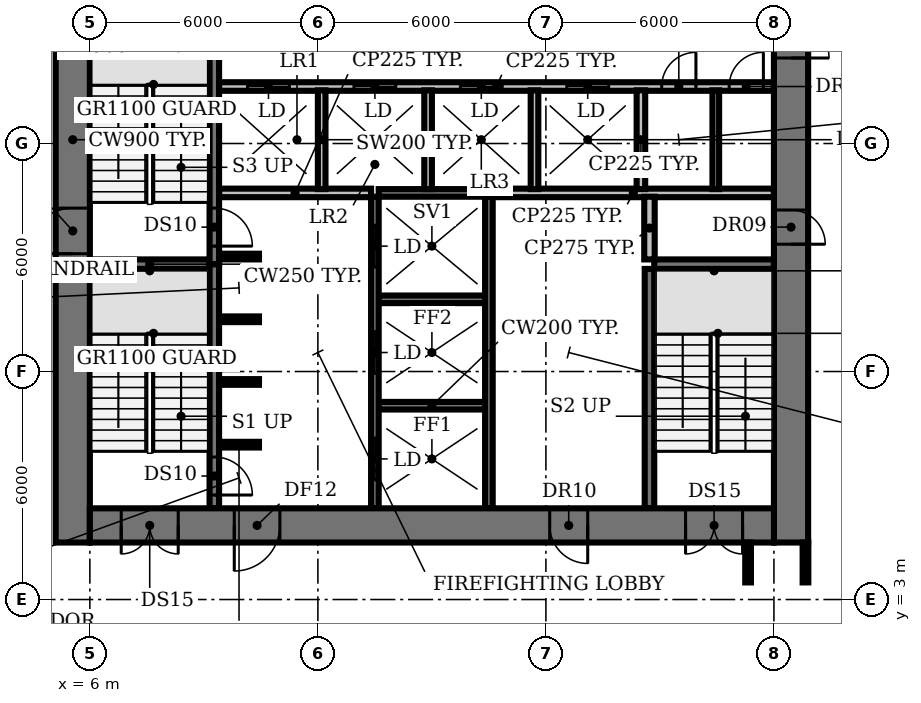
"""IFC4 building model, lengths in metres.
Left out: names, types, materials, properties, quantities, classifications, styles, units other than length and angle.
Written with IfcOpenShell. Run it as: python <this file> out.ifc"""

import sys

from ifc_helpers import new_model, si_unit, direction, frame, frame_2d, origin, place, context, subcontext, project, spatial, rectangle, extrude, element, fill, save


model = new_model("IFC4")
c1 = context("Model", 3, precision=1e-05, world=origin(), true_north=direction((0.0, 1.0)))
c2 = subcontext(c1, "Body", "Model", "MODEL_VIEW")
j1 = project(units=[si_unit("LENGTHUNIT", "METRE"), si_unit("PLANEANGLEUNIT", "RADIAN")], contexts=[c1])
p1 = place(None, origin())
s1 = spatial("IfcSite", under=j1, at=p1, CompositionType="ELEMENT")
p2 = place(p1, origin())
s2 = spatial("IfcBuilding", under=s1, at=p2, CompositionType="ELEMENT")
p3 = place(p2, frame((0.0, 0.0, 24.5)))
s3 = spatial("IfcBuildingStorey", under=s2, at=p3, CompositionType="ELEMENT", Elevation=24.5)
p4 = place(p3, frame((9.4, 7.075, 0.0), z_axis=(0.0, 0.0, 1.0), x_axis=(1.0, 0.0, 0.0)))
e1 = element("IfcWall", 1, at=p4, inside=s3, PredefinedType="SHEAR", context=c2, shape_type="SweptSolid", body=[
    extrude(rectangle(XDim=1.05, YDim=0.15, at=frame_2d((0.525, 0.0))), origin(), (0.0, 0.0, 1.0), 4.15),
])
p5 = place(p3, frame((13.6, 8.1, 0.0), z_axis=(0.0, 0.0, 1.0), x_axis=(1.0, 0.0, 0.0)))
e2 = element("IfcWall", 2, at=p5, inside=s3, PredefinedType="SHEAR", context=c2, shape_type="SweptSolid", body=[
    extrude(rectangle(XDim=2.8, YDim=0.2, at=frame_2d((1.4, 0.0))), origin(), (0.0, 0.0, 1.0), 4.15),
])
for number, where, z_axis, x_axis in (
    (3, (9.4, 8.725, 0.0), (0.0, 0.0, 1.0), (1.0, 0.0, 0.0)),
    (4, (9.4, 10.375, 0.0), (0.0, 0.0, 1.0), (1.0, 0.0, 0.0)),
):
    element("IfcWall", number, at=place(p3, frame(where, z_axis=z_axis, x_axis=x_axis)), inside=s3, PredefinedType="SHEAR", context=c2, shape_type="SweptSolid", body=[
        extrude(rectangle(XDim=1.05, YDim=0.15, at=frame_2d((0.525, 0.0))), origin(), (0.0, 0.0, 1.0), 4.15),
    ])
p6 = place(p3, frame((13.6, 10.9, 0.0), z_axis=(0.0, 0.0, 1.0), x_axis=(1.0, 0.0, 0.0)))
e5 = element("IfcWall", 5, at=p6, inside=s3, PredefinedType="SHEAR", context=c2, shape_type="SweptSolid", body=[
    extrude(rectangle(XDim=2.8, YDim=0.2, at=frame_2d((1.4, 0.0))), origin(), (0.0, 0.0, 1.0), 4.15),
])
for number, where, z_axis, x_axis in (
    (6, (6.0, 11.825, 0.0), (0.0, 0.0, 1.0), (1.0, 0.0, 0.0)),
    (7, (20.85, 11.825, 0.0), (0.0, 0.0, 1.0), (1.0, 0.0, 0.0)),
):
    element("IfcWall", number, at=place(p3, frame(where, z_axis=z_axis, x_axis=x_axis)), inside=s3, PredefinedType="SHEAR", context=c2, shape_type="SweptSolid", body=[
        extrude(rectangle(XDim=3.15, YDim=0.25, at=frame_2d((1.575, 0.0))), origin(), (0.0, 0.0, 1.0), 4.15),
    ])
p7 = place(p3, frame((9.4, 12.025, 0.0), z_axis=(0.0, 0.0, 1.0), x_axis=(1.0, 0.0, 0.0)))
e8 = element("IfcWall", 8, at=p7, inside=s3, PredefinedType="SHEAR", context=c2, shape_type="SweptSolid", body=[
    extrude(rectangle(XDim=1.05, YDim=0.15, at=frame_2d((0.525, 0.0))), origin(), (0.0, 0.0, 1.0), 4.15),
])
p8 = place(p3, frame((9.4, 13.7, 0.0), z_axis=(0.0, 0.0, 1.0), x_axis=(1.0, 0.0, 0.0)))
e9 = element("IfcWall", 9, at=p8, inside=s3, PredefinedType="PARTITIONING", context=c2, shape_type="SweptSolid", body=[
    extrude(rectangle(XDim=4.0, YDim=0.225, at=frame_2d((2.0, 0.0))), origin(), (0.0, 0.0, 1.0), 4.15),
])
p9 = place(p3, frame((13.6, 13.7, 0.0), z_axis=(0.0, 0.0, 1.0), x_axis=(1.0, 0.0, 0.0)))
e10 = element("IfcWall", 10, at=p9, inside=s3, PredefinedType="SHEAR", context=c2, shape_type="SweptSolid", body=[
    extrude(rectangle(XDim=2.8, YDim=0.2, at=frame_2d((1.4, 0.0))), origin(), (0.0, 0.0, 1.0), 4.15),
])
p10 = place(p3, frame((16.6, 13.7, 0.0), z_axis=(0.0, 0.0, 1.0), x_axis=(1.0, 0.0, 0.0)))
e11 = element("IfcWall", 11, at=p10, inside=s3, PredefinedType="PARTITIONING", context=c2, shape_type="SweptSolid", body=[
    extrude(rectangle(XDim=7.4, YDim=0.225, at=frame_2d((3.7, 0.0))), origin(), (0.0, 0.0, 1.0), 4.15),
])
p11 = place(p3, frame((9.4, 16.5, 0.0), z_axis=(0.0, 0.0, 1.0), x_axis=(1.0, 0.0, 0.0)))
e12 = element("IfcWall", 12, at=p11, inside=s3, PredefinedType="PARTITIONING", context=c2, shape_type="SweptSolid", body=[
    extrude(rectangle(XDim=14.6, YDim=0.225, at=frame_2d((7.3, 0.0))), origin(), (0.0, 0.0, 1.0), 4.15),
])
p12 = place(p11, frame((0.75, 0.0, 0.0)))
e13 = element("IfcOpeningElement", 13, at=p12, cuts=e12, PredefinedType="OPENING", context=c2, shape_type="SweptSolid", body=[
    extrude(rectangle(XDim=1.1, YDim=2.1, at=frame_2d((0.55, 1.05))), frame((0.0, 0.123, 0.0), z_axis=(0.0, -1.0, 0.0), x_axis=(1.0, 0.0, 0.0)), (0.0, 0.0, 1.0), 0.245),
])
p13 = place(p11, frame((3.55, 0.0, 0.0)))
e14 = element("IfcOpeningElement", 14, at=p13, cuts=e12, PredefinedType="OPENING", context=c2, shape_type="SweptSolid", body=[
    extrude(rectangle(XDim=1.1, YDim=2.1, at=frame_2d((0.55, 1.05))), frame((0.0, 0.123, 0.0), z_axis=(0.0, -1.0, 0.0), x_axis=(1.0, 0.0, 0.0)), (0.0, 0.0, 1.0), 0.245),
])
p14 = place(p11, frame((6.35, 0.0, 0.0)))
e15 = element("IfcOpeningElement", 15, at=p14, cuts=e12, PredefinedType="OPENING", context=c2, shape_type="SweptSolid", body=[
    extrude(rectangle(XDim=1.1, YDim=2.1, at=frame_2d((0.55, 1.05))), frame((0.0, 0.123, 0.0), z_axis=(0.0, -1.0, 0.0), x_axis=(1.0, 0.0, 0.0)), (0.0, 0.0, 1.0), 0.245),
])
p15 = place(p11, frame((9.15, 0.0, 0.0)))
e16 = element("IfcOpeningElement", 16, at=p15, cuts=e12, PredefinedType="OPENING", context=c2, shape_type="SweptSolid", body=[
    extrude(rectangle(XDim=1.1, YDim=2.1, at=frame_2d((0.55, 1.05))), frame((0.0, 0.123, 0.0), z_axis=(0.0, -1.0, 0.0), x_axis=(1.0, 0.0, 0.0)), (0.0, 0.0, 1.0), 0.245),
])
p16 = place(p11, frame((11.647, 0.0, 0.0)))
e17 = element("IfcOpeningElement", 17, at=p16, cuts=e12, PredefinedType="OPENING", context=c2, shape_type="SweptSolid", body=[
    extrude(rectangle(XDim=0.9, YDim=2.1, at=frame_2d((0.45, 1.05))), frame((0.0, 0.123, 0.0), z_axis=(0.0, -1.0, 0.0), x_axis=(1.0, 0.0, 0.0)), (0.0, 0.0, 1.0), 0.245),
])
p17 = place(p11, frame((13.423, 0.0, 0.0)))
e18 = element("IfcOpeningElement", 18, at=p17, cuts=e12, PredefinedType="OPENING", context=c2, shape_type="SweptSolid", body=[
    extrude(rectangle(XDim=0.9, YDim=2.1, at=frame_2d((0.45, 1.05))), frame((0.0, 0.123, 0.0), z_axis=(0.0, -1.0, 0.0), x_axis=(1.0, 0.0, 0.0)), (0.0, 0.0, 1.0), 0.245),
])
p18 = place(p3, frame((9.275, 11.825, 0.0), z_axis=(0.0, 0.0, 1.0), x_axis=(0.0, -1.0, 0.0)))
e19 = element("IfcWall", 19, at=p18, inside=s3, PredefinedType="SHEAR", context=c2, shape_type="SweptSolid", body=[
    extrude(rectangle(XDim=6.425, YDim=0.25, at=frame_2d((3.212, 0.0))), origin(), (0.0, 0.0, 1.0), 4.15),
])
p19 = place(p18, frame((5.075, 0.0, 0.0)))
e20 = element("IfcOpeningElement", 20, at=p19, cuts=e19, PredefinedType="OPENING", context=c2, shape_type="SweptSolid", body=[
    extrude(rectangle(XDim=1.0, YDim=2.1, at=frame_2d((0.5, 1.05))), frame((0.0, 0.135, 0.0), z_axis=(0.0, -1.0, 0.0), x_axis=(1.0, 0.0, 0.0)), (0.0, 0.0, 1.0), 0.27),
])
p20 = place(p3, frame((9.275, 18.375, 0.0), z_axis=(0.0, 0.0, 1.0), x_axis=(0.0, -1.0, 0.0)))
e21 = element("IfcWall", 21, at=p20, inside=s3, PredefinedType="SHEAR", context=c2, shape_type="SweptSolid", body=[
    extrude(rectangle(XDim=6.55, YDim=0.25, at=frame_2d((3.275, 0.0))), origin(), (0.0, 0.0, 1.0), 4.15),
])
p21 = place(p20, frame((5.075, 0.0, 0.0)))
e22 = element("IfcOpeningElement", 22, at=p21, cuts=e21, PredefinedType="OPENING", context=c2, shape_type="SweptSolid", body=[
    extrude(rectangle(XDim=1.0, YDim=2.1, at=frame_2d((0.5, 1.05))), frame((0.0, 0.135, 0.0), z_axis=(0.0, -1.0, 0.0), x_axis=(1.0, 0.0, 0.0)), (0.0, 0.0, 1.0), 0.27),
])
p22 = place(p3, frame((12.1, 13.8, 0.0), z_axis=(0.0, 0.0, 1.0), x_axis=(0.0, 1.0, 0.0)))
e23 = element("IfcWall", 23, at=p22, inside=s3, PredefinedType="SOLIDWALL", context=c2, shape_type="SweptSolid", body=[
    extrude(rectangle(XDim=2.6, YDim=0.2, at=frame_2d((1.3, 0.0))), origin(), (0.0, 0.0, 1.0), 4.15),
])
p23 = place(p3, frame((13.5, 5.4, 0.0), z_axis=(0.0, 0.0, 1.0), x_axis=(0.0, 1.0, 0.0)))
e24 = element("IfcWall", 24, at=p23, inside=s3, PredefinedType="SHEAR", context=c2, shape_type="SweptSolid", body=[
    extrude(rectangle(XDim=8.2, YDim=0.2, at=frame_2d((4.1, 0.0))), origin(), (0.0, 0.0, 1.0), 4.15),
])
p24 = place(p23, frame((0.75, 0.0, 0.0)))
e25 = element("IfcOpeningElement", 25, at=p24, cuts=e24, PredefinedType="OPENING", context=c2, shape_type="SweptSolid", body=[
    extrude(rectangle(XDim=1.1, YDim=2.1, at=frame_2d((0.55, 1.05))), frame((0.0, 0.11, 0.0), z_axis=(0.0, -1.0, 0.0), x_axis=(1.0, 0.0, 0.0)), (0.0, 0.0, 1.0), 0.22),
])
p25 = place(p23, frame((3.55, 0.0, 0.0)))
e26 = element("IfcOpeningElement", 26, at=p25, cuts=e24, PredefinedType="OPENING", context=c2, shape_type="SweptSolid", body=[
    extrude(rectangle(XDim=1.1, YDim=2.1, at=frame_2d((0.55, 1.05))), frame((0.0, 0.11, 0.0), z_axis=(0.0, -1.0, 0.0), x_axis=(1.0, 0.0, 0.0)), (0.0, 0.0, 1.0), 0.22),
])
p26 = place(p23, frame((6.35, 0.0, 0.0)))
e27 = element("IfcOpeningElement", 27, at=p26, cuts=e24, PredefinedType="OPENING", context=c2, shape_type="SweptSolid", body=[
    extrude(rectangle(XDim=1.1, YDim=2.1, at=frame_2d((0.55, 1.05))), frame((0.0, 0.11, 0.0), z_axis=(0.0, -1.0, 0.0), x_axis=(1.0, 0.0, 0.0)), (0.0, 0.0, 1.0), 0.22),
])
p27 = place(p3, frame((14.9, 13.8, 0.0), z_axis=(0.0, 0.0, 1.0), x_axis=(0.0, 1.0, 0.0)))
e28 = element("IfcWall", 28, at=p27, inside=s3, PredefinedType="SOLIDWALL", context=c2, shape_type="SweptSolid", body=[
    extrude(rectangle(XDim=2.6, YDim=0.2, at=frame_2d((1.3, 0.0))), origin(), (0.0, 0.0, 1.0), 4.15),
])
p28 = place(p3, frame((16.5, 5.4, 0.0), z_axis=(0.0, 0.0, 1.0), x_axis=(0.0, 1.0, 0.0)))
e29 = element("IfcWall", 29, at=p28, inside=s3, PredefinedType="SHEAR", context=c2, shape_type="SweptSolid", body=[
    extrude(rectangle(XDim=8.2, YDim=0.2, at=frame_2d((4.1, 0.0))), origin(), (0.0, 0.0, 1.0), 4.15),
])
p29 = place(p3, frame((17.7, 13.8, 0.0), z_axis=(0.0, 0.0, 1.0), x_axis=(0.0, 1.0, 0.0)))
e30 = element("IfcWall", 30, at=p29, inside=s3, PredefinedType="SOLIDWALL", context=c2, shape_type="SweptSolid", body=[
    extrude(rectangle(XDim=2.6, YDim=0.2, at=frame_2d((1.3, 0.0))), origin(), (0.0, 0.0, 1.0), 4.15),
])
p30 = place(p3, frame((20.5, 13.8, 0.0), z_axis=(0.0, 0.0, 1.0), x_axis=(0.0, 1.0, 0.0)))
e31 = element("IfcWall", 31, at=p30, inside=s3, PredefinedType="PARTITIONING", context=c2, shape_type="SweptSolid", body=[
    extrude(rectangle(XDim=2.6, YDim=0.225, at=frame_2d((1.3, 0.0))), origin(), (0.0, 0.0, 1.0), 4.15),
])
p31 = place(p3, frame((20.725, 5.4, 0.0), z_axis=(0.0, 0.0, 1.0), x_axis=(0.0, 1.0, 0.0)))
e32 = element("IfcWall", 32, at=p31, inside=s3, PredefinedType="SHEAR", context=c2, shape_type="SweptSolid", body=[
    extrude(rectangle(XDim=6.3, YDim=0.25, at=frame_2d((3.15, 0.0))), origin(), (0.0, 0.0, 1.0), 4.15),
])
p32 = place(p3, frame((20.725, 11.95, 0.0), z_axis=(0.0, 0.0, 1.0), x_axis=(0.0, 1.0, 0.0)))
e33 = element("IfcWall", 33, at=p32, inside=s3, PredefinedType="PARTITIONING", context=c2, shape_type="SweptSolid", body=[
    extrude(rectangle(XDim=1.65, YDim=0.275, at=frame_2d((0.825, 0.0))), origin(), (0.0, 0.0, 1.0), 4.15),
])
p33 = place(p3, frame((22.47, 13.8, 0.0), z_axis=(0.0, 0.0, 1.0), x_axis=(0.0, 1.0, 0.0)))
e34 = element("IfcWall", 34, at=p33, inside=s3, PredefinedType="PARTITIONING", context=c2, shape_type="SweptSolid", body=[
    extrude(rectangle(XDim=2.6, YDim=0.175, at=frame_2d((1.3, 0.0))), origin(), (0.0, 0.0, 1.0), 4.15),
])
p34 = place(p3, frame((5.55, 4.5, 0.0), z_axis=(0.0, 0.0, 1.0), x_axis=(0.0, 1.0, 0.0)))
e35 = element("IfcWall", 35, at=p34, inside=s3, PredefinedType="SHEAR", context=c2, shape_type="SweptSolid", body=[
    extrude(rectangle(XDim=21.2, YDim=0.9, at=frame_2d((10.6, 0.0))), origin(), (0.0, 0.0, 1.0), 4.15),
])
p35 = place(p34, frame((7.6, 0.0, 0.0)))
e36 = element("IfcOpeningElement", 36, at=p35, cuts=e35, PredefinedType="OPENING", context=c2, shape_type="SweptSolid", body=[
    extrude(rectangle(XDim=1.2, YDim=2.1, at=frame_2d((0.6, 1.05))), frame((0.0, 0.46, 0.0), z_axis=(0.0, -1.0, 0.0), x_axis=(1.0, 0.0, 0.0)), (0.0, 0.0, 1.0), 0.92),
])
p36 = place(p34, frame((14.15, 0.0, 0.0)))
e37 = element("IfcOpeningElement", 37, at=p36, cuts=e35, PredefinedType="OPENING", context=c2, shape_type="SweptSolid", body=[
    extrude(rectangle(XDim=1.2, YDim=2.1, at=frame_2d((0.6, 1.05))), frame((0.0, 0.46, 0.0), z_axis=(0.0, -1.0, 0.0), x_axis=(1.0, 0.0, 0.0)), (0.0, 0.0, 1.0), 0.92),
])
p37 = place(p3, frame((24.45, 25.7, 0.0), z_axis=(0.0, 0.0, 1.0), x_axis=(0.0, -1.0, 0.0)))
e38 = element("IfcWall", 38, at=p37, inside=s3, PredefinedType="SHEAR", context=c2, shape_type="SweptSolid", body=[
    extrude(rectangle(XDim=21.2, YDim=0.9, at=frame_2d((10.6, 0.0))), origin(), (0.0, 0.0, 1.0), 4.15),
])
p38 = place(p37, frame((12.45, 0.0, 0.0)))
e39 = element("IfcOpeningElement", 39, at=p38, cuts=e38, PredefinedType="OPENING", context=c2, shape_type="SweptSolid", body=[
    extrude(rectangle(XDim=0.9, YDim=2.1, at=frame_2d((0.45, 1.05))), frame((0.0, 0.46, 0.0), z_axis=(0.0, -1.0, 0.0), x_axis=(1.0, 0.0, 0.0)), (0.0, 0.0, 1.0), 0.92),
])
p39 = place(p37, frame((6.45, 0.0, 0.0)))
e40 = element("IfcOpeningElement", 40, at=p39, cuts=e38, PredefinedType="OPENING", context=c2, shape_type="SweptSolid", body=[
    extrude(rectangle(XDim=2.0, YDim=2.1, at=frame_2d((1.0, 1.05))), frame((0.0, 0.46, 0.0), z_axis=(0.0, -1.0, 0.0), x_axis=(1.0, 0.0, 0.0)), (0.0, 0.0, 1.0), 0.92),
])
p40 = place(p3, frame((24.0, 4.95, 0.0), z_axis=(0.0, 0.0, 1.0), x_axis=(-1.0, 0.0, 0.0)))
e41 = element("IfcWall", 41, at=p40, inside=s3, PredefinedType="SHEAR", context=c2, shape_type="SweptSolid", body=[
    extrude(rectangle(XDim=18.0, YDim=0.9, at=frame_2d((9.0, 0.0))), origin(), (0.0, 0.0, 1.0), 4.15),
])
p41 = place(p40, frame((15.675, 0.0, 0.0)))
e42 = element("IfcOpeningElement", 42, at=p41, cuts=e41, PredefinedType="OPENING", context=c2, shape_type="SweptSolid", body=[
    extrude(rectangle(XDim=1.5, YDim=2.1, at=frame_2d((0.75, 1.05))), frame((0.0, 0.46, 0.0), z_axis=(0.0, -1.0, 0.0), x_axis=(1.0, 0.0, 0.0)), (0.0, 0.0, 1.0), 0.92),
])
p42 = place(p40, frame((0.825, 0.0, 0.0)))
e43 = element("IfcOpeningElement", 43, at=p42, cuts=e41, PredefinedType="OPENING", context=c2, shape_type="SweptSolid", body=[
    extrude(rectangle(XDim=1.5, YDim=2.1, at=frame_2d((0.75, 1.05))), frame((0.0, 0.46, 0.0), z_axis=(0.0, -1.0, 0.0), x_axis=(1.0, 0.0, 0.0)), (0.0, 0.0, 1.0), 0.92),
])
p43 = place(p40, frame((13.0, 0.0, 0.0)))
e44 = element("IfcOpeningElement", 44, at=p43, cuts=e41, PredefinedType="OPENING", context=c2, shape_type="SweptSolid", body=[
    extrude(rectangle(XDim=1.2, YDim=2.1, at=frame_2d((0.6, 1.05))), frame((0.0, 0.46, 0.0), z_axis=(0.0, -1.0, 0.0), x_axis=(1.0, 0.0, 0.0)), (0.0, 0.0, 1.0), 0.92),
])
p44 = place(p40, frame((4.9, 0.0, 0.0)))
e45 = element("IfcOpeningElement", 45, at=p44, cuts=e41, PredefinedType="OPENING", context=c2, shape_type="SweptSolid", body=[
    extrude(rectangle(XDim=1.0, YDim=2.1, at=frame_2d((0.5, 1.05))), frame((0.0, 0.46, 0.0), z_axis=(0.0, -1.0, 0.0), x_axis=(1.0, 0.0, 0.0)), (0.0, 0.0, 1.0), 0.92),
])
for number, where, z_axis, x_axis in (
    (46, (23.32, 3.45, 0.0), (0.0, 0.0, 1.0), (0.0, 1.0, 0.0)),
    (47, (24.83, 3.45, 0.0), (0.0, 0.0, 1.0), (0.0, 1.0, 0.0)),
):
    element("IfcWall", number, at=place(p3, frame(where, z_axis=z_axis, x_axis=x_axis)), inside=s3, PredefinedType="PARTITIONING", context=c2, shape_type="SweptSolid", body=[
        extrude(rectangle(XDim=1.05, YDim=0.15, at=frame_2d((0.525, 0.0))), origin(), (0.0, 0.0, 1.0), 3.08),
    ])
p45 = place(p12, origin())
e48 = element("IfcDoor", 48, at=p45, inside=s3, OperationType="DOUBLE_DOOR_SLIDING", PredefinedType="DOOR", context=c2, shape_type="SweptSolid", body=[
    extrude(rectangle(XDim=1.1, YDim=2.1, at=frame_2d((0.55, 1.05))), frame((0.0, 0.025, 0.0), z_axis=(0.0, -1.0, 0.0), x_axis=(1.0, 0.0, 0.0)), (0.0, 0.0, 1.0), 0.05),
])
fill(e13, e48)
p46 = place(p13, origin())
e49 = element("IfcDoor", 49, at=p46, inside=s3, OperationType="DOUBLE_DOOR_SLIDING", PredefinedType="DOOR", context=c2, shape_type="SweptSolid", body=[
    extrude(rectangle(XDim=1.1, YDim=2.1, at=frame_2d((0.55, 1.05))), frame((0.0, 0.025, 0.0), z_axis=(0.0, -1.0, 0.0), x_axis=(1.0, 0.0, 0.0)), (0.0, 0.0, 1.0), 0.05),
])
fill(e14, e49)
p47 = place(p14, origin())
e50 = element("IfcDoor", 50, at=p47, inside=s3, OperationType="DOUBLE_DOOR_SLIDING", PredefinedType="DOOR", context=c2, shape_type="SweptSolid", body=[
    extrude(rectangle(XDim=1.1, YDim=2.1, at=frame_2d((0.55, 1.05))), frame((0.0, 0.025, 0.0), z_axis=(0.0, -1.0, 0.0), x_axis=(1.0, 0.0, 0.0)), (0.0, 0.0, 1.0), 0.05),
])
fill(e15, e50)
p48 = place(p15, origin())
e51 = element("IfcDoor", 51, at=p48, inside=s3, OperationType="DOUBLE_DOOR_SLIDING", PredefinedType="DOOR", context=c2, shape_type="SweptSolid", body=[
    extrude(rectangle(XDim=1.1, YDim=2.1, at=frame_2d((0.55, 1.05))), frame((0.0, 0.025, 0.0), z_axis=(0.0, -1.0, 0.0), x_axis=(1.0, 0.0, 0.0)), (0.0, 0.0, 1.0), 0.05),
])
fill(e16, e51)
p49 = place(p16, origin())
e52 = element("IfcDoor", 52, at=p49, inside=s3, OperationType="SINGLE_SWING_RIGHT", PredefinedType="DOOR", context=c2, shape_type="SweptSolid", body=[
    extrude(rectangle(XDim=0.9, YDim=2.1, at=frame_2d((0.45, 1.05))), frame((0.0, 0.025, 0.0), z_axis=(0.0, -1.0, 0.0), x_axis=(1.0, 0.0, 0.0)), (0.0, 0.0, 1.0), 0.05),
])
fill(e17, e52)
p50 = place(p17, origin())
e53 = element("IfcDoor", 53, at=p50, inside=s3, OperationType="SINGLE_SWING_RIGHT", PredefinedType="DOOR", context=c2, shape_type="SweptSolid", body=[
    extrude(rectangle(XDim=0.9, YDim=2.1, at=frame_2d((0.45, 1.05))), frame((0.0, 0.025, 0.0), z_axis=(0.0, -1.0, 0.0), x_axis=(1.0, 0.0, 0.0)), (0.0, 0.0, 1.0), 0.05),
])
fill(e18, e53)
p51 = place(p19, origin())
e54 = element("IfcDoor", 54, at=p51, inside=s3, OperationType="SINGLE_SWING_RIGHT", PredefinedType="DOOR", context=c2, shape_type="SweptSolid", body=[
    extrude(rectangle(XDim=1.0, YDim=2.1, at=frame_2d((0.5, 1.05))), frame((0.0, 0.025, 0.0), z_axis=(0.0, -1.0, 0.0), x_axis=(1.0, 0.0, 0.0)), (0.0, 0.0, 1.0), 0.05),
])
fill(e20, e54)
p52 = place(p21, origin())
e55 = element("IfcDoor", 55, at=p52, inside=s3, OperationType="SINGLE_SWING_RIGHT", PredefinedType="DOOR", context=c2, shape_type="SweptSolid", body=[
    extrude(rectangle(XDim=1.0, YDim=2.1, at=frame_2d((0.5, 1.05))), frame((0.0, 0.025, 0.0), z_axis=(0.0, -1.0, 0.0), x_axis=(1.0, 0.0, 0.0)), (0.0, 0.0, 1.0), 0.05),
])
fill(e22, e55)
p53 = place(p24, origin())
e56 = element("IfcDoor", 56, at=p53, inside=s3, OperationType="DOUBLE_DOOR_SLIDING", PredefinedType="DOOR", context=c2, shape_type="SweptSolid", body=[
    extrude(rectangle(XDim=1.1, YDim=2.1, at=frame_2d((0.55, 1.05))), frame((0.0, 0.025, 0.0), z_axis=(0.0, -1.0, 0.0), x_axis=(1.0, 0.0, 0.0)), (0.0, 0.0, 1.0), 0.05),
])
fill(e25, e56)
p54 = place(p25, origin())
e57 = element("IfcDoor", 57, at=p54, inside=s3, OperationType="DOUBLE_DOOR_SLIDING", PredefinedType="DOOR", context=c2, shape_type="SweptSolid", body=[
    extrude(rectangle(XDim=1.1, YDim=2.1, at=frame_2d((0.55, 1.05))), frame((0.0, 0.025, 0.0), z_axis=(0.0, -1.0, 0.0), x_axis=(1.0, 0.0, 0.0)), (0.0, 0.0, 1.0), 0.05),
])
fill(e26, e57)
p55 = place(p26, origin())
e58 = element("IfcDoor", 58, at=p55, inside=s3, OperationType="DOUBLE_DOOR_SLIDING", PredefinedType="DOOR", context=c2, shape_type="SweptSolid", body=[
    extrude(rectangle(XDim=1.1, YDim=2.1, at=frame_2d((0.55, 1.05))), frame((0.0, 0.025, 0.0), z_axis=(0.0, -1.0, 0.0), x_axis=(1.0, 0.0, 0.0)), (0.0, 0.0, 1.0), 0.05),
])
fill(e27, e58)
p56 = place(p35, origin())
e59 = element("IfcDoor", 59, at=p56, inside=s3, OperationType="SINGLE_SWING_LEFT", PredefinedType="DOOR", context=c2, shape_type="SweptSolid", body=[
    extrude(rectangle(XDim=1.2, YDim=2.1, at=frame_2d((0.6, 1.05))), frame((0.0, 0.025, 0.0), z_axis=(0.0, -1.0, 0.0), x_axis=(1.0, 0.0, 0.0)), (0.0, 0.0, 1.0), 0.05),
])
fill(e36, e59)
p57 = place(p38, origin())
e60 = element("IfcDoor", 60, at=p57, inside=s3, OperationType="SINGLE_SWING_RIGHT", PredefinedType="DOOR", context=c2, shape_type="SweptSolid", body=[
    extrude(rectangle(XDim=0.9, YDim=2.1, at=frame_2d((0.45, 1.05))), frame((0.0, -0.39, 0.0), z_axis=(0.0, -1.0, 0.0), x_axis=(1.0, 0.0, 0.0)), (0.0, 0.0, 1.0), 0.05),
])
fill(e39, e60)
p58 = place(p39, origin())
e61 = element("IfcDoor", 61, at=p58, inside=s3, OperationType="DOUBLE_DOOR_SINGLE_SWING", PredefinedType="DOOR", context=c2, shape_type="SweptSolid", body=[
    extrude(rectangle(XDim=2.0, YDim=2.1, at=frame_2d((1.0, 1.05))), frame((0.0, 0.025, 0.0), z_axis=(0.0, -1.0, 0.0), x_axis=(1.0, 0.0, 0.0)), (0.0, 0.0, 1.0), 0.05),
])
fill(e40, e61)
p59 = place(p41, origin())
e62 = element("IfcDoor", 62, at=p59, inside=s3, OperationType="DOUBLE_DOOR_SINGLE_SWING", PredefinedType="DOOR", context=c2, shape_type="SweptSolid", body=[
    extrude(rectangle(XDim=1.5, YDim=2.1, at=frame_2d((0.75, 1.05))), frame((0.0, 0.025, 0.0), z_axis=(0.0, -1.0, 0.0), x_axis=(1.0, 0.0, 0.0)), (0.0, 0.0, 1.0), 0.05),
])
fill(e42, e62)
p60 = place(p42, origin())
e63 = element("IfcDoor", 63, at=p60, inside=s3, OperationType="DOUBLE_DOOR_SINGLE_SWING", PredefinedType="DOOR", context=c2, shape_type="SweptSolid", body=[
    extrude(rectangle(XDim=1.5, YDim=2.1, at=frame_2d((0.75, 1.05))), frame((0.0, 0.025, 0.0), z_axis=(0.0, -1.0, 0.0), x_axis=(1.0, 0.0, 0.0)), (0.0, 0.0, 1.0), 0.05),
])
fill(e43, e63)
p61 = place(p43, origin())
e64 = element("IfcDoor", 64, at=p61, inside=s3, OperationType="SINGLE_SWING_RIGHT", PredefinedType="DOOR", context=c2, shape_type="SweptSolid", body=[
    extrude(rectangle(XDim=1.2, YDim=2.1, at=frame_2d((0.6, 1.05))), frame((0.0, 0.025, 0.0), z_axis=(0.0, -1.0, 0.0), x_axis=(1.0, 0.0, 0.0)), (0.0, 0.0, 1.0), 0.05),
])
fill(e44, e64)
p62 = place(p44, origin())
e65 = element("IfcDoor", 65, at=p62, inside=s3, OperationType="SINGLE_SWING_LEFT", PredefinedType="DOOR", context=c2, shape_type="SweptSolid", body=[
    extrude(rectangle(XDim=1.0, YDim=2.1, at=frame_2d((0.5, 1.05))), frame((0.0, -0.39, 0.0), z_axis=(0.0, -1.0, 0.0), x_axis=(1.0, 0.0, 0.0)), (0.0, 0.0, 1.0), 0.05),
])
fill(e45, e65)
save(model, sys.argv[1])
